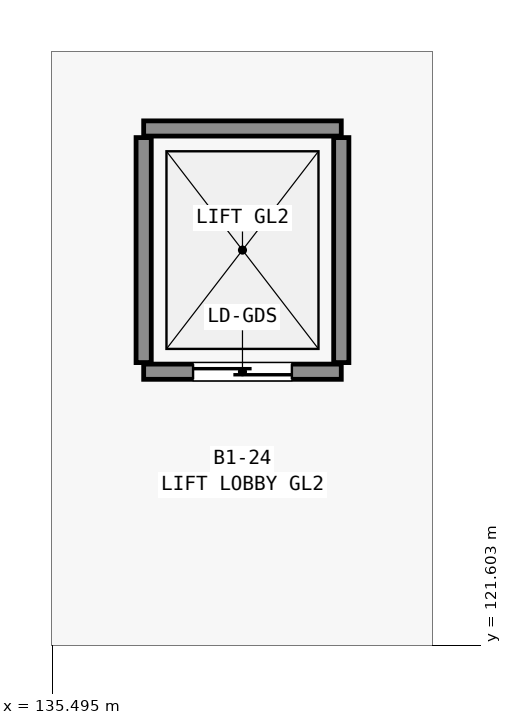
"""IFC4 building model, lengths in metres.
Left out: names, types, materials, properties, quantities, classifications, styles, units other than length and angle.
Written with IfcOpenShell. Run it as: python <this file> out.ifc"""

import sys

from ifc_helpers import new_model, si_unit, direction, frame, frame_2d, origin, place, context, subcontext, project, spatial, rectangle, extrude, element, fill, save


model = new_model("IFC4")
c1 = context("Model", 3, precision=1e-05, world=origin(), true_north=direction((0.0, 1.0)))
c2 = subcontext(c1, "Body", "Model", "MODEL_VIEW")
j1 = project(units=[si_unit("LENGTHUNIT", "METRE"), si_unit("PLANEANGLEUNIT", "RADIAN")], contexts=[c1])
p1 = place(None, origin())
s1 = spatial("IfcSite", under=j1, at=p1, CompositionType="ELEMENT")
p2 = place(p1, origin())
s2 = spatial("IfcBuilding", under=s1, at=p2, CompositionType="ELEMENT")
p3 = place(p2, frame((0.0, 0.0, -5.4)))
s3 = spatial("IfcBuildingStorey", under=s2, at=p3, CompositionType="ELEMENT", Elevation=-5.4)
p4 = place(p3, frame((136.7, 125.2, 0.0), z_axis=(0.0, 0.0, 1.0), x_axis=(1.0, 0.0, 0.0)))
e1 = element("IfcWall", 1, at=p4, inside=s3, PredefinedType="STANDARD", context=c2, shape_type="SweptSolid", body=[
    extrude(rectangle(XDim=2.6, YDim=0.2, at=frame_2d((1.3, 0.0))), origin(), (0.0, 0.0, 1.0), 5.0),
])
p5 = place(p4, frame((0.65, 0.0, 0.0)))
e2 = element("IfcOpeningElement", 2, at=p5, cuts=e1, PredefinedType="OPENING", context=c2, shape_type="SweptSolid", body=[
    extrude(rectangle(XDim=1.3, YDim=2.15, at=frame_2d((0.65, 1.075))), frame((0.0, 0.11, 0.0), z_axis=(0.0, -1.0, 0.0), x_axis=(1.0, 0.0, 0.0)), (0.0, 0.0, 1.0), 0.22),
])
p6 = place(p3, frame((136.7, 128.4, 0.0), z_axis=(0.0, 0.0, 1.0), x_axis=(1.0, 0.0, 0.0)))
e3 = element("IfcWall", 3, at=p6, inside=s3, PredefinedType="STANDARD", context=c2, shape_type="SweptSolid", body=[
    extrude(rectangle(XDim=2.6, YDim=0.2, at=frame_2d((1.3, 0.0))), origin(), (0.0, 0.0, 1.0), 5.0),
])
for number, where, z_axis, x_axis in (
    (4, (136.7, 125.32, 0.0), (0.0, 0.0, 1.0), (0.0, 1.0, 0.0)),
    (5, (139.3, 125.32, 0.0), (0.0, 0.0, 1.0), (0.0, 1.0, 0.0)),
):
    element("IfcWall", number, at=place(p3, frame(where, z_axis=z_axis, x_axis=x_axis)), inside=s3, PredefinedType="STANDARD", context=c2, shape_type="SweptSolid", body=[
        extrude(rectangle(XDim=2.96, YDim=0.2, at=frame_2d((1.48, 0.0))), origin(), (0.0, 0.0, 1.0), 5.0),
    ])
p7 = place(p5, origin())
e6 = element("IfcDoor", 6, at=p7, inside=s3, OperationType="SLIDING_TO_LEFT", PredefinedType="DOOR", context=c2, shape_type="SweptSolid", body=[
    extrude(rectangle(XDim=1.3, YDim=2.15, at=frame_2d((0.65, 1.075))), frame((0.0, 0.025, 0.0), z_axis=(0.0, -1.0, 0.0), x_axis=(1.0, 0.0, 0.0)), (0.0, 0.0, 1.0), 0.05),
])
fill(e2, e6)
save(model, sys.argv[1])
